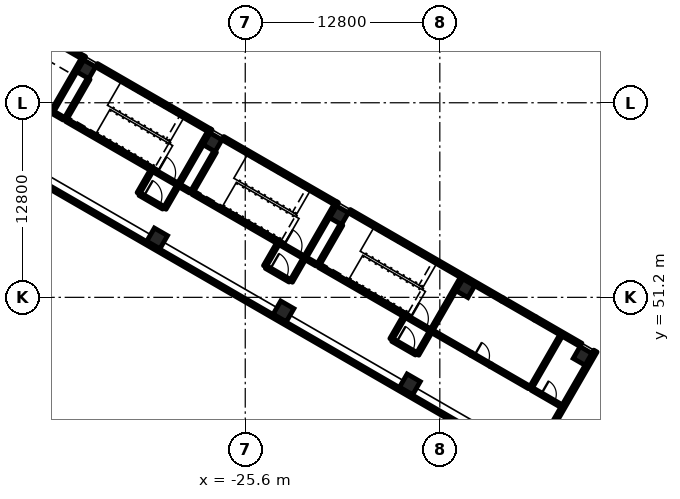
"""IFC4 building model, lengths in metres.
Left out: names, types, materials, properties, quantities, classifications, styles, units other than length and angle.
Written with IfcOpenShell. Run it as: python <this file> out.ifc"""

import sys

from ifc_helpers import new_model, si_unit, direction, frame, frame_2d, origin, origin_2d, place, context, subcontext, project, spatial, rectangle, extrude, element, fill, save


model = new_model("IFC4")
c1 = context("Model", 3, precision=1e-05, world=origin(), true_north=direction((0.0, 1.0)))
c2 = subcontext(c1, "Body", "Model", "MODEL_VIEW")
j1 = project(units=[si_unit("LENGTHUNIT", "METRE"), si_unit("PLANEANGLEUNIT", "RADIAN")], contexts=[c1])
p1 = place(None, origin())
s1 = spatial("IfcSite", under=j1, at=p1, CompositionType="ELEMENT")
p2 = place(p1, origin())
s2 = spatial("IfcBuilding", under=s1, at=p2, CompositionType="ELEMENT")
p3 = place(p2, frame((0.0, 0.0, 16.2)))
s3 = spatial("IfcBuildingStorey", under=s2, at=p3, CompositionType="ELEMENT", Elevation=16.2)
for number, where, z_axis, x_axis in (
    (1, (-3.41, 47.349, 0.0), (0.0, 0.0, 1.0), (-0.5, -0.866, 0.0)),
    (2, (-11.118, 51.799, 0.0), (0.0, 0.0, 1.0), (-0.5, -0.866, 0.0)),
    (3, (-19.432, 56.599, 0.0), (0.0, 0.0, 1.0), (-0.5, -0.866, 0.0)),
    (4, (-27.746, 61.399, 0.0), (0.0, 0.0, 1.0), (-0.5, -0.866, 0.0)),
    (5, (-36.06, 66.199, 0.0), (0.0, 0.0, 1.0), (-0.5, -0.866, 0.0)),
):
    element("IfcColumn", number, at=place(p3, frame(where, z_axis=z_axis, x_axis=x_axis)), inside=s3, PredefinedType="COLUMN", context=c2, shape_type="SweptSolid", body=[
        extrude(rectangle(XDim=0.9, YDim=0.9, at=origin_2d()), origin(), (0.0, 0.0, 1.0), 5.4),
    ])
for number, where, z_axis, x_axis in (
    (6, (-14.768, 45.477, 0.0), (0.0, 0.0, 1.0), (-0.5, -0.866, 0.0)),
    (7, (-23.082, 50.277, 0.0), (0.0, 0.0, 1.0), (-0.5, -0.866, 0.0)),
    (8, (-31.396, 55.077, 0.0), (0.0, 0.0, 1.0), (-0.5, -0.866, 0.0)),
):
    element("IfcColumn", number, at=place(p3, frame(where, z_axis=z_axis, x_axis=x_axis)), inside=s3, PredefinedType="COLUMN", context=c2, shape_type="SweptSolid", body=[
        extrude(rectangle(XDim=1.0, YDim=1.0, at=origin_2d()), origin(), (0.0, 0.0, 1.0), 5.4),
    ])
p4 = place(p3, frame((-2.562, 47.667, 0.0), z_axis=(0.0, 0.0, 1.0), x_axis=(-0.499999331568, -0.866025789703, 0.0)))
e9 = element("IfcWall", 9, at=p4, inside=s3, PredefinedType="SOLIDWALL", context=c2, shape_type="SweptSolid", body=[
    extrude(rectangle(XDim=8.625, YDim=0.25, at=frame_2d((4.312, 0.0))), origin(), (0.0, 0.0, 1.0), 5.0),
])
p5 = place(p3, frame((-6.522, 49.809, 0.0), z_axis=(0.0, 0.0, 1.0), x_axis=(0.866055725969, -0.499947476758, 0.0)))
e10 = element("IfcWall", 10, at=p5, inside=s3, PredefinedType="SOLIDWALL", context=c2, shape_type="SweptSolid", body=[
    extrude(rectangle(XDim=3.475, YDim=0.25, at=frame_2d((1.737, 0.0))), origin(), (0.0, 0.0, 1.0), 5.0),
])
p6 = place(p3, frame((-8.687, 51.059, 0.0), z_axis=(0.0, 0.0, 1.0), x_axis=(0.866022959057, -0.500004234368, 0.0)))
e11 = element("IfcWall", 11, at=p6, inside=s3, PredefinedType="SOLIDWALL", context=c2, shape_type="SweptSolid", body=[
    extrude(rectangle(XDim=2.5, YDim=0.25, at=frame_2d((1.25, 0.0))), origin(), (0.0, 0.0, 1.0), 5.0),
])
p7 = place(p6, frame((0.25, 0.0, 0.9)))
e12 = element("IfcOpeningElement", 12, at=p7, cuts=e11, PredefinedType="OPENING", context=c2, shape_type="SweptSolid", body=[
    extrude(rectangle(XDim=2.0, YDim=1.8, at=frame_2d((1.0, 0.9))), frame((0.0, 0.135, 0.0), z_axis=(0.0, -1.0, 0.0), x_axis=(1.0, 0.0, 0.0)), (0.0, 0.0, 1.0), 0.27),
])
p8 = place(p3, frame((-18.755, 56.872, 0.0), z_axis=(0.0, 0.0, 1.0), x_axis=(0.866027159341, -0.499996959274, 0.0)))
e13 = element("IfcWall", 13, at=p8, inside=s3, PredefinedType="SOLIDWALL", context=c2, shape_type="SweptSolid", body=[
    extrude(rectangle(XDim=11.625, YDim=0.25, at=frame_2d((5.812, 0.0))), origin(), (0.0, 0.0, 1.0), 5.0),
])
p9 = place(p3, frame((-27.069, 61.672, 0.0), z_axis=(0.0, 0.0, 1.0), x_axis=(0.866021068297, -0.500007509209, 0.0)))
e14 = element("IfcWall", 14, at=p9, inside=s3, PredefinedType="SOLIDWALL", context=c2, shape_type="SweptSolid", body=[
    extrude(rectangle(XDim=8.6, YDim=0.25, at=frame_2d((4.3, 0.0))), origin(), (0.0, 0.0, 1.0), 5.0),
])
p10 = place(p3, frame((-35.383, 66.472, 0.0), z_axis=(0.0, 0.0, 1.0), x_axis=(0.866028165386, -0.499995216735, 0.0)))
e15 = element("IfcWall", 15, at=p10, inside=s3, PredefinedType="SOLIDWALL", context=c2, shape_type="SweptSolid", body=[
    extrude(rectangle(XDim=8.6, YDim=0.25, at=frame_2d((4.3, 0.0))), origin(), (0.0, 0.0, 1.0), 5.0),
])
p11 = place(p3, frame((-40.752, 69.572, 0.0), z_axis=(0.0, 0.0, 1.0), x_axis=(0.866009661879, -0.500027264788, 0.0)))
e16 = element("IfcWall", 16, at=p11, inside=s3, PredefinedType="SOLIDWALL", context=c2, shape_type="SweptSolid", body=[
    extrude(rectangle(XDim=5.2, YDim=0.25, at=frame_2d((2.6, 0.0))), origin(), (0.0, 0.0, 1.0), 5.0),
])
p12 = place(p3, frame((-19.621, 57.372, 0.0), z_axis=(0.0, 0.0, 1.0), x_axis=(0.867038199201, -0.4982416694, 0.0)))
e17 = element("IfcWall", 17, at=p12, inside=s3, PredefinedType="SOLIDWALL", context=c2, shape_type="SweptSolid", body=[
    extrude(rectangle(XDim=0.1, YDim=0.25, at=frame_2d((0.05, 0.0))), origin(), (0.0, 0.0, 1.0), 5.0),
])
for number, where, z_axis, x_axis in (
    (18, (-27.935, 62.172, 0.0), (0.0, 0.0, 1.0), (0.866, -0.5, 0.0)),
    (19, (-36.249, 66.972, 0.0), (0.0, 0.0, 1.0), (0.866, -0.5, 0.0)),
):
    element("IfcWall", number, at=place(p3, frame(where, z_axis=z_axis, x_axis=x_axis)), inside=s3, PredefinedType="SOLIDWALL", context=c2, shape_type="SweptSolid", body=[
        extrude(rectangle(XDim=0.1, YDim=0.25, at=frame_2d((0.05, 0.0))), origin(), (0.0, 0.0, 1.0), 5.0),
    ])
p13 = place(p3, frame((-11.369, 52.463, 0.0), z_axis=(0.0, 0.0, 1.0), x_axis=(-0.50002537861, -0.866010750942, 0.0)))
e20 = element("IfcWall", 20, at=p13, inside=s3, PredefinedType="SOLIDWALL", context=c2, shape_type="SweptSolid", body=[
    extrude(rectangle(XDim=4.0, YDim=0.2, at=frame_2d((2.0, 0.0))), origin(), (0.0, 0.0, 1.0), 5.0),
])
p14 = place(p3, frame((-19.267, 55.984, 0.0), z_axis=(0.0, 0.0, 1.0), x_axis=(-0.49999285859, -0.86602952684, 0.0)))
e21 = element("IfcWall", 21, at=p14, inside=s3, PredefinedType="SOLIDWALL", context=c2, shape_type="SweptSolid", body=[
    extrude(rectangle(XDim=3.1, YDim=0.2, at=frame_2d((1.55, 0.0))), origin(), (0.0, 0.0, 1.0), 5.0),
])
p15 = place(p3, frame((-19.683, 57.263, 0.0), z_axis=(0.0, 0.0, 1.0), x_axis=(-0.49999894854, -0.866026010844, 0.0)))
e22 = element("IfcWall", 22, at=p15, inside=s3, PredefinedType="SOLIDWALL", context=c2, shape_type="SweptSolid", body=[
    extrude(rectangle(XDim=4.0, YDim=0.2, at=frame_2d((2.0, 0.0))), origin(), (0.0, 0.0, 1.0), 5.0),
])
p16 = place(p3, frame((-27.581, 60.784, 0.0), z_axis=(0.0, 0.0, 1.0), x_axis=(-0.49999285859, -0.86602952684, 0.0)))
e23 = element("IfcWall", 23, at=p16, inside=s3, PredefinedType="SOLIDWALL", context=c2, shape_type="SweptSolid", body=[
    extrude(rectangle(XDim=3.1, YDim=0.2, at=frame_2d((1.55, 0.0))), origin(), (0.0, 0.0, 1.0), 5.0),
])
p17 = place(p3, frame((-27.997, 62.063, 0.0), z_axis=(0.0, 0.0, 1.0), x_axis=(-0.49999894854, -0.866026010844, 0.0)))
e24 = element("IfcWall", 24, at=p17, inside=s3, PredefinedType="SOLIDWALL", context=c2, shape_type="SweptSolid", body=[
    extrude(rectangle(XDim=4.0, YDim=0.2, at=frame_2d((2.0, 0.0))), origin(), (0.0, 0.0, 1.0), 5.0),
])
p18 = place(p3, frame((-35.895, 65.584, 0.0), z_axis=(0.0, 0.0, 1.0), x_axis=(-0.500026960575, -0.86600983753, 0.0)))
e25 = element("IfcWall", 25, at=p18, inside=s3, PredefinedType="SOLIDWALL", context=c2, shape_type="SweptSolid", body=[
    extrude(rectangle(XDim=3.1, YDim=0.2, at=frame_2d((1.55, 0.0))), origin(), (0.0, 0.0, 1.0), 5.0),
])
p19 = place(p3, frame((-14.972, 49.924, 0.0), z_axis=(0.0, 0.0, 1.0), x_axis=(0.866036909293, -0.499980071345, 0.0)))
e26 = element("IfcWall", 26, at=p19, inside=s3, PredefinedType="SOLIDWALL", context=c2, shape_type="SweptSolid", body=[
    extrude(rectangle(XDim=1.75, YDim=0.2, at=frame_2d((0.875, 0.0))), origin(), (0.0, 0.0, 1.0), 5.0),
])
p20 = place(p19, frame((0.25, 0.0, 0.0)))
e27 = element("IfcOpeningElement", 27, at=p20, cuts=e26, PredefinedType="OPENING", context=c2, shape_type="SweptSolid", body=[
    extrude(rectangle(XDim=1.2, YDim=2.1, at=frame_2d((0.6, 1.05))), frame((0.0, 0.11, 0.0), z_axis=(0.0, -1.0, 0.0), x_axis=(1.0, 0.0, 0.0)), (0.0, 0.0, 1.0), 0.22),
])
p21 = place(p3, frame((-14.972, 49.924, 0.0), z_axis=(0.0, 0.0, 1.0), x_axis=(-0.86601134256, 0.500024353964, 0.0)))
e28 = element("IfcWall", 28, at=p21, inside=s3, PredefinedType="SOLIDWALL", context=c2, shape_type="SweptSolid", body=[
    extrude(rectangle(XDim=6.65, YDim=0.2, at=frame_2d((3.325, 0.0))), origin(), (0.0, 0.0, 1.0), 5.0),
])
p22 = place(p3, frame((-23.285, 54.724, 0.0), z_axis=(0.0, 0.0, 1.0), x_axis=(0.866002029911, -0.500040482552, 0.0)))
e29 = element("IfcWall", 29, at=p22, inside=s3, PredefinedType="SOLIDWALL", context=c2, shape_type="SweptSolid", body=[
    extrude(rectangle(XDim=1.75, YDim=0.2, at=frame_2d((0.875, 0.0))), origin(), (0.0, 0.0, 1.0), 5.0),
])
p23 = place(p22, frame((0.25, 0.0, 0.0)))
e30 = element("IfcOpeningElement", 30, at=p23, cuts=e29, PredefinedType="OPENING", context=c2, shape_type="SweptSolid", body=[
    extrude(rectangle(XDim=1.2, YDim=2.1, at=frame_2d((0.6, 1.05))), frame((0.0, 0.11, 0.0), z_axis=(0.0, -1.0, 0.0), x_axis=(1.0, 0.0, 0.0)), (0.0, 0.0, 1.0), 0.22),
])
p24 = place(p3, frame((-23.285, 54.724, 0.0), z_axis=(0.0, 0.0, 1.0), x_axis=(-0.866027239912, 0.49999681972, 0.0)))
e31 = element("IfcWall", 31, at=p24, inside=s3, PredefinedType="SOLIDWALL", context=c2, shape_type="SweptSolid", body=[
    extrude(rectangle(XDim=6.65, YDim=0.2, at=frame_2d((3.325, 0.0))), origin(), (0.0, 0.0, 1.0), 5.0),
])
p25 = place(p3, frame((-31.599, 59.524, 0.0), z_axis=(0.0, 0.0, 1.0), x_axis=(0.866036909293, -0.499980071345, 0.0)))
e32 = element("IfcWall", 32, at=p25, inside=s3, PredefinedType="SOLIDWALL", context=c2, shape_type="SweptSolid", body=[
    extrude(rectangle(XDim=1.75, YDim=0.2, at=frame_2d((0.875, 0.0))), origin(), (0.0, 0.0, 1.0), 5.0),
])
p26 = place(p25, frame((0.25, 0.0, 0.0)))
e33 = element("IfcOpeningElement", 33, at=p26, cuts=e32, PredefinedType="OPENING", context=c2, shape_type="SweptSolid", body=[
    extrude(rectangle(XDim=1.2, YDim=2.1, at=frame_2d((0.6, 1.05))), frame((0.0, 0.11, 0.0), z_axis=(0.0, -1.0, 0.0), x_axis=(1.0, 0.0, 0.0)), (0.0, 0.0, 1.0), 0.22),
])
p27 = place(p3, frame((-31.599, 59.524, 0.0), z_axis=(0.0, 0.0, 1.0), x_axis=(-0.866027239912, 0.49999681972, 0.0)))
e34 = element("IfcWall", 34, at=p27, inside=s3, PredefinedType="SOLIDWALL", context=c2, shape_type="SweptSolid", body=[
    extrude(rectangle(XDim=6.65, YDim=0.2, at=frame_2d((3.325, 0.0))), origin(), (0.0, 0.0, 1.0), 5.0),
])
p28 = place(p3, frame((-36.311, 66.864, 0.0), z_axis=(0.0, 0.0, 1.0), x_axis=(-0.49999894854, -0.866026010844, 0.0)))
e35 = element("IfcWall", 35, at=p28, inside=s3, PredefinedType="SOLIDWALL", context=c2, shape_type="SweptSolid", body=[
    extrude(rectangle(XDim=4.0, YDim=0.2, at=frame_2d((2.0, 0.0))), origin(), (0.0, 0.0, 1.0), 5.0),
])
p29 = place(p3, frame((-13.419, 48.913, 0.0), z_axis=(0.0, 0.0, 1.0), x_axis=(-0.500000056704, -0.866025371046, 0.0)))
e36 = element("IfcWall", 36, at=p29, inside=s3, PredefinedType="PARTITIONING", context=c2, shape_type="SweptSolid", body=[
    extrude(rectangle(XDim=1.7, YDim=0.2, at=frame_2d((0.85, 0.0))), origin(), (0.0, 0.0, 1.0), 4.1),
])
for number, where, z_axis, x_axis in (
    (37, (-15.152, 49.913, 0.0), (0.0, 0.0, 1.0), (-0.5, -0.866, 0.0)),
    (38, (-21.733, 53.713, 0.0), (0.0, 0.0, 1.0), (-0.5, -0.866, 0.0)),
):
    element("IfcWall", number, at=place(p3, frame(where, z_axis=z_axis, x_axis=x_axis)), inside=s3, PredefinedType="PARTITIONING", context=c2, shape_type="SweptSolid", body=[
        extrude(rectangle(XDim=1.7, YDim=0.2, at=frame_2d((0.85, 0.0))), origin(), (0.0, 0.0, 1.0), 4.1),
    ])
p30 = place(p3, frame((-23.465, 54.713, 0.0), z_axis=(0.0, 0.0, 1.0), x_axis=(-0.500000056704, -0.866025371046, 0.0)))
e39 = element("IfcWall", 39, at=p30, inside=s3, PredefinedType="PARTITIONING", context=c2, shape_type="SweptSolid", body=[
    extrude(rectangle(XDim=1.7, YDim=0.2, at=frame_2d((0.85, 0.0))), origin(), (0.0, 0.0, 1.0), 4.1),
])
for number, where, z_axis, x_axis in (
    (40, (-30.047, 58.513, 0.0), (0.0, 0.0, 1.0), (-0.5, -0.866, 0.0)),
    (41, (-31.779, 59.513, 0.0), (0.0, 0.0, 1.0), (-0.5, -0.866, 0.0)),
):
    element("IfcWall", number, at=place(p3, frame(where, z_axis=z_axis, x_axis=x_axis)), inside=s3, PredefinedType="PARTITIONING", context=c2, shape_type="SweptSolid", body=[
        extrude(rectangle(XDim=1.7, YDim=0.2, at=frame_2d((0.85, 0.0))), origin(), (0.0, 0.0, 1.0), 4.1),
    ])
p31 = place(p3, frame((-15.915, 48.39, 0.0), z_axis=(0.0, 0.0, 1.0), x_axis=(0.866013897511, -0.50001992892, 0.0)))
e42 = element("IfcWall", 42, at=p31, inside=s3, PredefinedType="PARTITIONING", context=c2, shape_type="SweptSolid", body=[
    extrude(rectangle(XDim=1.8, YDim=0.2, at=frame_2d((0.9, 0.0))), origin(), (0.0, 0.0, 1.0), 4.1),
])
p32 = place(p31, frame((0.3, 0.0, 0.0)))
e43 = element("IfcOpeningElement", 43, at=p32, cuts=e42, PredefinedType="OPENING", context=c2, shape_type="SweptSolid", body=[
    extrude(rectangle(XDim=1.2, YDim=2.1, at=frame_2d((0.6, 1.05))), frame((0.0, 0.11, 0.0), z_axis=(0.0, -1.0, 0.0), x_axis=(1.0, 0.0, 0.0)), (0.0, 0.0, 1.0), 0.22),
])
p33 = place(p3, frame((-24.229, 53.19, 0.0), z_axis=(0.0, 0.0, 1.0), x_axis=(0.866047807691, -0.499961193289, 0.0)))
e44 = element("IfcWall", 44, at=p33, inside=s3, PredefinedType="PARTITIONING", context=c2, shape_type="SweptSolid", body=[
    extrude(rectangle(XDim=1.8, YDim=0.2, at=frame_2d((0.9, 0.0))), origin(), (0.0, 0.0, 1.0), 4.1),
])
p34 = place(p33, frame((0.3, 0.0, 0.0)))
e45 = element("IfcOpeningElement", 45, at=p34, cuts=e44, PredefinedType="OPENING", context=c2, shape_type="SweptSolid", body=[
    extrude(rectangle(XDim=1.2, YDim=2.1, at=frame_2d((0.6, 1.05))), frame((0.0, 0.11, 0.0), z_axis=(0.0, -1.0, 0.0), x_axis=(1.0, 0.0, 0.0)), (0.0, 0.0, 1.0), 0.22),
])
p35 = place(p3, frame((-32.542, 57.99, 0.0), z_axis=(0.0, 0.0, 1.0), x_axis=(0.866047807691, -0.499961193289, 0.0)))
e46 = element("IfcWall", 46, at=p35, inside=s3, PredefinedType="PARTITIONING", context=c2, shape_type="SweptSolid", body=[
    extrude(rectangle(XDim=1.8, YDim=0.2, at=frame_2d((0.9, 0.0))), origin(), (0.0, 0.0, 1.0), 4.1),
])
p36 = place(p35, frame((0.3, 0.0, 0.0)))
e47 = element("IfcOpeningElement", 47, at=p36, cuts=e46, PredefinedType="OPENING", context=c2, shape_type="SweptSolid", body=[
    extrude(rectangle(XDim=1.2, YDim=2.1, at=frame_2d((0.6, 1.05))), frame((0.0, 0.11, 0.0), z_axis=(0.0, -1.0, 0.0), x_axis=(1.0, 0.0, 0.0)), (0.0, 0.0, 1.0), 0.22),
])
p37 = place(p3, frame((-4.831, 48.688, 0.0), z_axis=(0.0, 0.0, 1.0), x_axis=(-0.49999894854, -0.866026010844, 0.0)))
e48 = element("IfcWall", 48, at=p37, inside=s3, PredefinedType="PARTITIONING", context=c2, shape_type="SweptSolid", body=[
    extrude(rectangle(XDim=4.0, YDim=0.2, at=frame_2d((2.0, 0.0))), origin(), (0.0, 0.0, 1.0), 4.1),
])
p38 = place(p3, frame((-6.744, 45.174, 0.0), z_axis=(0.0, 0.0, 1.0), x_axis=(0.866017533419, -0.500013631625, 0.0)))
e49 = element("IfcWall", 49, at=p38, inside=s3, PredefinedType="PARTITIONING", context=c2, shape_type="SweptSolid", body=[
    extrude(rectangle(XDim=2.25, YDim=0.2, at=frame_2d((1.125, 0.0))), origin(), (0.0, 0.0, 1.0), 4.1),
])
p39 = place(p38, frame((0.7, 0.0, 0.0)))
e50 = element("IfcOpeningElement", 50, at=p39, cuts=e49, PredefinedType="OPENING", context=c2, shape_type="SweptSolid", body=[
    extrude(rectangle(XDim=1.0, YDim=2.1, at=frame_2d((0.5, 1.05))), frame((0.0, 0.11, 0.0), z_axis=(0.0, -1.0, 0.0), x_axis=(1.0, 0.0, 0.0)), (0.0, 0.0, 1.0), 0.22),
])
p40 = place(p3, frame((-6.917, 45.274, 0.0), z_axis=(0.0, 0.0, 1.0), x_axis=(-0.866046596414, 0.499963291492, 0.0)))
e51 = element("IfcWall", 51, at=p40, inside=s3, PredefinedType="PARTITIONING", context=c2, shape_type="SweptSolid", body=[
    extrude(rectangle(XDim=2.925, YDim=0.2, at=frame_2d((1.462, 0.0))), origin(), (0.0, 0.0, 1.0), 4.1),
])
p41 = place(p3, frame((-10.75, 47.487, 0.0), z_axis=(0.0, 0.0, 1.0), x_axis=(0.866031096941, -0.499990139034, 0.0)))
e52 = element("IfcWall", 52, at=p41, inside=s3, PredefinedType="PARTITIONING", context=c2, shape_type="SweptSolid", body=[
    extrude(rectangle(XDim=1.5, YDim=0.2, at=frame_2d((0.75, 0.0))), origin(), (0.0, 0.0, 1.0), 4.1),
])
p42 = place(p41, frame((0.25, 0.0, 0.0)))
e53 = element("IfcOpeningElement", 53, at=p42, cuts=e52, PredefinedType="OPENING", context=c2, shape_type="SweptSolid", body=[
    extrude(rectangle(XDim=1.0, YDim=2.1, at=frame_2d((0.5, 1.05))), frame((0.0, 0.11, 0.0), z_axis=(0.0, -1.0, 0.0), x_axis=(1.0, 0.0, 0.0)), (0.0, 0.0, 1.0), 0.22),
])
p43 = place(p3, frame((-10.75, 47.487, 0.0), z_axis=(0.0, 0.0, 1.0), x_axis=(-0.86601045545, 0.500025890382, 0.0)))
e54 = element("IfcWall", 54, at=p43, inside=s3, PredefinedType="PARTITIONING", context=c2, shape_type="SweptSolid", body=[
    extrude(rectangle(XDim=2.925, YDim=0.2, at=frame_2d((1.462, 0.0))), origin(), (0.0, 0.0, 1.0), 4.1),
])
p44 = place(p3, frame((-20.904, 53.349, 0.0), z_axis=(0.0, 0.0, 1.0), x_axis=(-0.865961984968, 0.500109828528, 0.0)))
e55 = element("IfcWall", 55, at=p44, inside=s3, PredefinedType="PARTITIONING", context=c2, shape_type="SweptSolid", body=[
    extrude(rectangle(XDim=0.8, YDim=0.2, at=frame_2d((0.4, 0.0))), origin(), (0.0, 0.0, 1.0), 4.1),
])
p45 = place(p3, frame((-29.218, 58.149, 0.0), z_axis=(0.0, 0.0, 1.0), x_axis=(-0.866017831539, 0.500013115284, 0.0)))
e56 = element("IfcWall", 56, at=p45, inside=s3, PredefinedType="PARTITIONING", context=c2, shape_type="SweptSolid", body=[
    extrude(rectangle(XDim=0.8, YDim=0.2, at=frame_2d((0.4, 0.0))), origin(), (0.0, 0.0, 1.0), 4.1),
])
p46 = place(p3, frame((-37.531, 62.949, 0.0), z_axis=(0.0, 0.0, 1.0), x_axis=(-0.866094119867, 0.499880961361, 0.0)))
e57 = element("IfcWall", 57, at=p46, inside=s3, PredefinedType="PARTITIONING", context=c2, shape_type="SweptSolid", body=[
    extrude(rectangle(XDim=0.8, YDim=0.2, at=frame_2d((0.4, 0.0))), origin(), (0.0, 0.0, 1.0), 4.1),
])
p47 = place(p3, frame((-6.983, 40.26, 0.0), z_axis=(0.0, 0.0, 1.0), x_axis=(-0.866024244032, 0.500002008745, 0.0)))
e58 = element("IfcWall", 58, at=p47, inside=s3, PredefinedType="PARTITIONING", context=c2, shape_type="SweptSolid", body=[
    extrude(rectangle(XDim=47.5, YDim=0.2, at=frame_2d((23.75, 0.0))), origin(), (0.0, 0.0, 1.0), 4.1),
])
p48 = place(p7, origin())
e59 = element("IfcWindow", 59, at=p48, inside=s3, PartitioningType="SINGLE_PANEL", PredefinedType="WINDOW", context=c2, shape_type="SweptSolid", body=[
    extrude(rectangle(XDim=2.0, YDim=1.8, at=frame_2d((1.0, 0.9))), frame((0.0, 0.03, 0.0), z_axis=(0.0, -1.0, 0.0), x_axis=(1.0, 0.0, 0.0)), (0.0, 0.0, 1.0), 0.06),
])
fill(e12, e59)
p49 = place(p20, origin())
e60 = element("IfcDoor", 60, at=p49, inside=s3, OperationType="SINGLE_SWING_LEFT", PredefinedType="DOOR", context=c2, shape_type="SweptSolid", body=[
    extrude(rectangle(XDim=1.2, YDim=2.1, at=frame_2d((0.6, 1.05))), frame((0.0, 0.025, 0.0), z_axis=(0.0, -1.0, 0.0), x_axis=(1.0, 0.0, 0.0)), (0.0, 0.0, 1.0), 0.05),
])
fill(e27, e60)
p50 = place(p23, origin())
e61 = element("IfcDoor", 61, at=p50, inside=s3, OperationType="SINGLE_SWING_LEFT", PredefinedType="DOOR", context=c2, shape_type="SweptSolid", body=[
    extrude(rectangle(XDim=1.2, YDim=2.1, at=frame_2d((0.6, 1.05))), frame((0.0, 0.025, 0.0), z_axis=(0.0, -1.0, 0.0), x_axis=(1.0, 0.0, 0.0)), (0.0, 0.0, 1.0), 0.05),
])
fill(e30, e61)
p51 = place(p26, origin())
e62 = element("IfcDoor", 62, at=p51, inside=s3, OperationType="SINGLE_SWING_LEFT", PredefinedType="DOOR", context=c2, shape_type="SweptSolid", body=[
    extrude(rectangle(XDim=1.2, YDim=2.1, at=frame_2d((0.6, 1.05))), frame((0.0, 0.025, 0.0), z_axis=(0.0, -1.0, 0.0), x_axis=(1.0, 0.0, 0.0)), (0.0, 0.0, 1.0), 0.05),
])
fill(e33, e62)
p52 = place(p32, origin())
e63 = element("IfcDoor", 63, at=p52, inside=s3, OperationType="SINGLE_SWING_LEFT", PredefinedType="DOOR", context=c2, shape_type="SweptSolid", body=[
    extrude(rectangle(XDim=1.2, YDim=2.1, at=frame_2d((0.6, 1.05))), frame((0.0, 0.025, 0.0), z_axis=(0.0, -1.0, 0.0), x_axis=(1.0, 0.0, 0.0)), (0.0, 0.0, 1.0), 0.05),
])
fill(e43, e63)
p53 = place(p34, origin())
e64 = element("IfcDoor", 64, at=p53, inside=s3, OperationType="SINGLE_SWING_LEFT", PredefinedType="DOOR", context=c2, shape_type="SweptSolid", body=[
    extrude(rectangle(XDim=1.2, YDim=2.1, at=frame_2d((0.6, 1.05))), frame((0.0, 0.025, 0.0), z_axis=(0.0, -1.0, 0.0), x_axis=(1.0, 0.0, 0.0)), (0.0, 0.0, 1.0), 0.05),
])
fill(e45, e64)
p54 = place(p36, origin())
e65 = element("IfcDoor", 65, at=p54, inside=s3, OperationType="SINGLE_SWING_LEFT", PredefinedType="DOOR", context=c2, shape_type="SweptSolid", body=[
    extrude(rectangle(XDim=1.2, YDim=2.1, at=frame_2d((0.6, 1.05))), frame((0.0, 0.025, 0.0), z_axis=(0.0, -1.0, 0.0), x_axis=(1.0, 0.0, 0.0)), (0.0, 0.0, 1.0), 0.05),
])
fill(e47, e65)
p55 = place(p39, origin())
e66 = element("IfcDoor", 66, at=p55, inside=s3, OperationType="SINGLE_SWING_LEFT", PredefinedType="DOOR", context=c2, shape_type="SweptSolid", body=[
    extrude(rectangle(XDim=1.0, YDim=2.1, at=frame_2d((0.5, 1.05))), frame((0.0, 0.025, 0.0), z_axis=(0.0, -1.0, 0.0), x_axis=(1.0, 0.0, 0.0)), (0.0, 0.0, 1.0), 0.05),
])
fill(e50, e66)
p56 = place(p42, origin())
e67 = element("IfcDoor", 67, at=p56, inside=s3, OperationType="SINGLE_SWING_LEFT", PredefinedType="DOOR", context=c2, shape_type="SweptSolid", body=[
    extrude(rectangle(XDim=1.0, YDim=2.1, at=frame_2d((0.5, 1.05))), frame((0.0, 0.025, 0.0), z_axis=(0.0, -1.0, 0.0), x_axis=(1.0, 0.0, 0.0)), (0.0, 0.0, 1.0), 0.05),
])
fill(e53, e67)
save(model, sys.argv[1])
